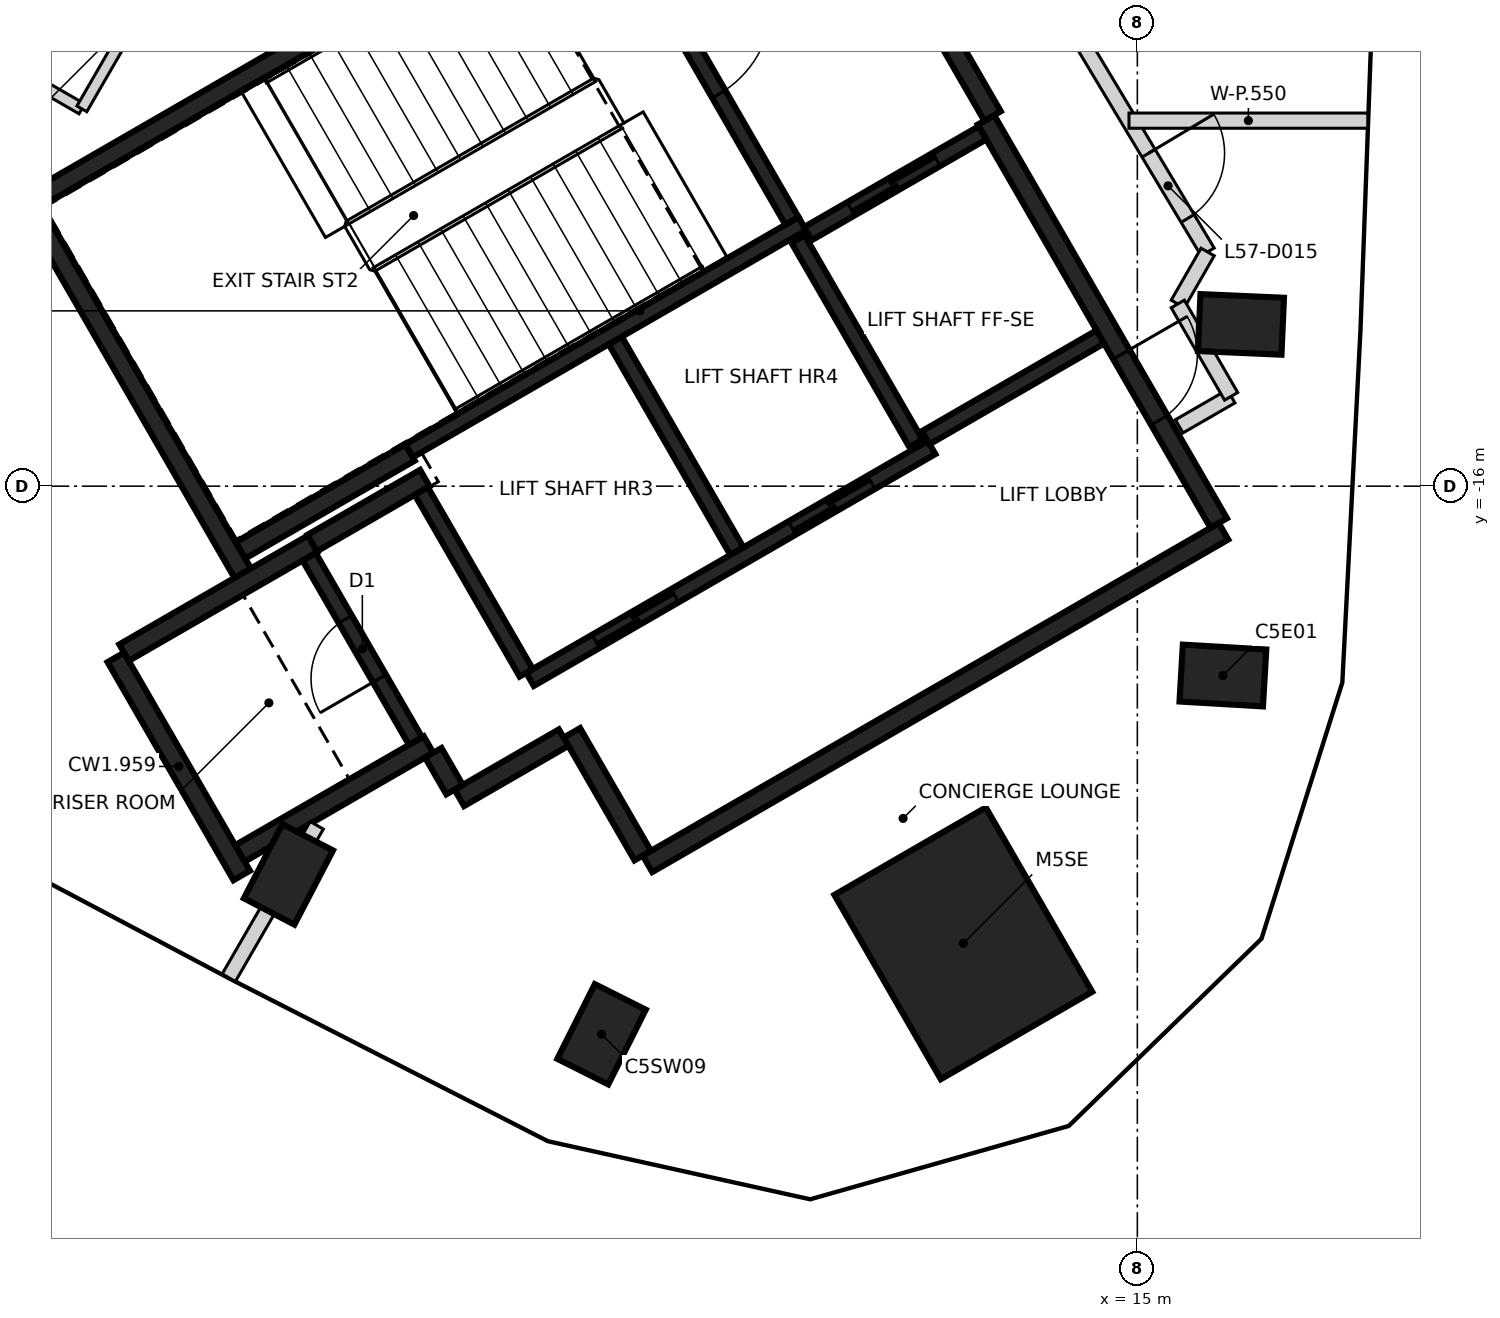
"""IFC4 building model, lengths in metres.
Left out: names, types, materials, properties, quantities, classifications, styles, units other than length and angle.
Written with IfcOpenShell. Run it as: python <this file> out.ifc"""

import sys

from ifc_helpers import new_model, si_unit, direction, frame, frame_2d, origin, origin_2d, place, context, subcontext, project, spatial, rectangle, extrude, element, fill, save


model = new_model("IFC4")
c1 = context("Model", 3, precision=1e-05, world=origin(), true_north=direction((0.0, 1.0)))
c2 = subcontext(c1, "Body", "Model", "MODEL_VIEW")
j1 = project(units=[si_unit("LENGTHUNIT", "METRE"), si_unit("PLANEANGLEUNIT", "RADIAN")], contexts=[c1])
p1 = place(None, origin())
s1 = spatial("IfcSite", under=j1, at=p1, CompositionType="ELEMENT")
p2 = place(p1, origin())
s2 = spatial("IfcBuilding", under=s1, at=p2, CompositionType="ELEMENT")
p3 = place(p2, frame((0.0, 0.0, 228.6)))
s3 = spatial("IfcBuildingStorey", under=s2, at=p3, CompositionType="ELEMENT", Elevation=228.6)
for number, where, z_axis, x_axis in (
    (1, (16.125, -18.491, -0.35), (0.0, 0.0, 1.0), (-0.998, 0.058, 0.0)),
    (2, (16.363, -13.872, -0.35), (0.0, 0.0, 1.0), (-0.999, 0.044, 0.0)),
    (3, (3.832, -21.107, -0.35), (0.0, 0.0, 1.0), (0.461, 0.887, 0.0)),
    (4, (7.951, -23.211, -0.35), (0.0, 0.0, 1.0), (0.449, 0.894, 0.0)),
):
    element("IfcColumn", number, at=place(p3, frame(where, z_axis=z_axis, x_axis=x_axis)), inside=s3, PredefinedType="COLUMN", context=c2, shape_type="SweptSolid", body=[
        extrude(rectangle(XDim=1.1, YDim=0.75, at=origin_2d()), origin(), (0.0, 0.0, 1.0), 3.6),
    ])
p4 = place(p3, frame((12.71, -22.015, -0.35), z_axis=(0.0, 0.0, 1.0), x_axis=(-0.5, 0.866025403784, 0.0)))
e5 = element("IfcColumn", 5, at=p4, inside=s3, PredefinedType="COLUMN", context=c2, shape_type="SweptSolid", body=[
    extrude(rectangle(XDim=2.8, YDim=2.3, at=origin_2d()), origin(), (0.0, 0.0, 1.0), 3.6),
])
p5 = place(p3, frame((0.417, -12.273, 0.0), z_axis=(0.0, 0.0, 1.0), x_axis=(0.866021906294, 0.500006057782, 0.0)))
e6 = element("IfcWall", 6, at=p5, inside=s3, PredefinedType="SHEAR", context=c2, shape_type="SweptSolid", body=[
    extrude(rectangle(XDim=11.55, YDim=0.25, at=frame_2d((5.775, 0.0))), origin(), (0.0, 0.0, 1.0), 3.25),
])
p6 = place(p5, frame((10.025, 0.0, 0.0)))
e7 = element("IfcOpeningElement", 7, at=p6, cuts=e6, PredefinedType="OPENING", context=c2, shape_type="SweptSolid", body=[
    extrude(rectangle(XDim=1.2, YDim=2.1, at=frame_2d((0.6, 1.05))), frame((0.0, 0.135, 0.0), z_axis=(0.0, -1.0, 0.0), x_axis=(1.0, 0.0, 0.0)), (0.0, 0.0, 1.0), 0.27),
])
p7 = place(p5, frame((8.725, 0.0, 0.0)))
e8 = element("IfcOpeningElement", 8, at=p7, cuts=e6, PredefinedType="OPENING", context=c2, shape_type="SweptSolid", body=[
    extrude(rectangle(XDim=1.2, YDim=2.1, at=frame_2d((0.6, 1.05))), frame((0.0, 0.135, 0.0), z_axis=(0.0, -1.0, 0.0), x_axis=(1.0, 0.0, 0.0)), (0.0, 0.0, 1.0), 0.27),
])
p8 = place(p3, frame((16.133, -16.594, 0.0), z_axis=(0.0, 0.0, 1.0), x_axis=(-0.866022959057, -0.500004234368, 0.0)))
e9 = element("IfcWall", 9, at=p8, inside=s3, PredefinedType="SHEAR", context=c2, shape_type="SweptSolid", body=[
    extrude(rectangle(XDim=8.75, YDim=0.25, at=frame_2d((4.375, 0.0))), origin(), (0.0, 0.0, 1.0), 3.25),
])
p9 = place(p3, frame((13.008, -11.181, 0.0), z_axis=(0.0, 0.0, 1.0), x_axis=(0.500001955336, -0.866024274868, 0.0)))
e10 = element("IfcWall", 10, at=p9, inside=s3, PredefinedType="SHEAR", context=c2, shape_type="SweptSolid", body=[
    extrude(rectangle(XDim=6.125, YDim=0.25, at=frame_2d((3.062, 0.0))), origin(), (0.0, 0.0, 1.0), 3.25),
])
p10 = place(p9, frame((3.563, 0.0, 0.0)))
e11 = element("IfcOpeningElement", 11, at=p10, cuts=e10, PredefinedType="OPENING", context=c2, shape_type="SweptSolid", body=[
    extrude(rectangle(XDim=1.0, YDim=2.1, at=frame_2d((0.5, 1.05))), frame((0.0, 0.135, 0.0), z_axis=(0.0, -1.0, 0.0), x_axis=(1.0, 0.0, 0.0)), (0.0, 0.0, 1.0), 0.27),
])
p11 = place(p3, frame((3.235, -17.153, 0.0), z_axis=(0.0, 0.0, 1.0), x_axis=(-0.500008851346, 0.866020293397, 0.0)))
e12 = element("IfcWall", 12, at=p11, inside=s3, PredefinedType="SHEAR", context=c2, shape_type="SweptSolid", body=[
    extrude(rectangle(XDim=5.51, YDim=0.25, at=frame_2d((2.755, 0.0))), origin(), (0.0, 0.0, 1.0), 3.25),
])
p12 = place(p3, frame((10.483, -6.606, 0.0), z_axis=(0.0, 0.0, 1.0), x_axis=(0.49999885962, -0.866026062182, 0.0)))
e13 = element("IfcWall", 13, at=p12, inside=s3, PredefinedType="SHEAR", context=c2, shape_type="SweptSolid", body=[
    extrude(rectangle(XDim=5.225, YDim=0.25, at=frame_2d((2.612, 0.0))), origin(), (0.0, 0.0, 1.0), 3.25),
])
p13 = place(p3, frame((3.217, -21.122, 0.0), z_axis=(0.0, 0.0, 1.0), x_axis=(-0.499998874531, 0.866026053573, 0.0)))
e14 = element("IfcWall", 14, at=p13, inside=s3, PredefinedType="SHEAR", context=c2, shape_type="SweptSolid", body=[
    extrude(rectangle(XDim=3.313, YDim=0.25, at=frame_2d((1.656, 0.0))), origin(), (0.0, 0.0, 1.0), 3.25),
])
p14 = place(p3, frame((1.669, -18.19, 0.0), z_axis=(0.0, 0.0, 1.0), x_axis=(0.866042235819, 0.499970844928, 0.0)))
e15 = element("IfcWall", 15, at=p14, inside=s3, PredefinedType="SHEAR", context=c2, shape_type="SweptSolid", body=[
    extrude(rectangle(XDim=2.865, YDim=0.25, at=frame_2d((1.432, 0.0))), origin(), (0.0, 0.0, 1.0), 3.25),
])
p15 = place(p3, frame((5.675, -19.399, 0.0), z_axis=(0.0, 0.0, 1.0), x_axis=(-0.866026637627, -0.499997862916, 0.0)))
e16 = element("IfcWall", 16, at=p15, inside=s3, PredefinedType="SHEAR", context=c2, shape_type="SweptSolid", body=[
    extrude(rectangle(XDim=2.865, YDim=0.25, at=frame_2d((1.432, 0.0))), origin(), (0.0, 0.0, 1.0), 3.25),
])
p16 = place(p3, frame((5.431, -15.556, 0.0), z_axis=(0.0, 0.0, 1.0), x_axis=(-0.866022940537, -0.500004266446, 0.0)))
e17 = element("IfcWall", 17, at=p16, inside=s3, PredefinedType="SHEAR", context=c2, shape_type="SweptSolid", body=[
    extrude(rectangle(XDim=2.575, YDim=0.25, at=frame_2d((1.287, 0.0))), origin(), (0.0, 0.0, 1.0), 3.25),
])
p17 = place(p3, frame((8.493, -20.86, 0.0), z_axis=(0.0, 0.0, 1.0), x_axis=(-0.500039802285, 0.866002422705, 0.0)))
e18 = element("IfcWall", 18, at=p17, inside=s3, PredefinedType="SHEAR", context=c2, shape_type="SweptSolid", body=[
    extrude(rectangle(XDim=1.865, YDim=0.25, at=frame_2d((0.932, 0.0))), origin(), (0.0, 0.0, 1.0), 3.25),
])
p18 = place(p3, frame((4.145, -16.749, 0.0), z_axis=(0.0, 0.0, 1.0), x_axis=(0.866038183914, 0.499977863513, 0.0)))
e19 = element("IfcWall", 19, at=p18, inside=s3, PredefinedType="SHEAR", context=c2, shape_type="SweptSolid", body=[
    extrude(rectangle(XDim=1.71, YDim=0.25, at=frame_2d((0.855, 0.0))), origin(), (0.0, 0.0, 1.0), 3.25),
])
p19 = place(p3, frame((7.452, -19.308, 0.0), z_axis=(0.0, 0.0, 1.0), x_axis=(-0.866044474677, -0.49996696679, 0.0)))
e20 = element("IfcWall", 20, at=p19, inside=s3, PredefinedType="SHEAR", context=c2, shape_type="SweptSolid", body=[
    extrude(rectangle(XDim=1.584, YDim=0.25, at=frame_2d((0.792, 0.0))), origin(), (0.0, 0.0, 1.0), 3.25),
])
p20 = place(p3, frame((6.017, -19.992, 0.0), z_axis=(0.0, 0.0, 1.0), x_axis=(-0.500364886717, 0.865814633822, 0.0)))
e21 = element("IfcWall", 21, at=p20, inside=s3, PredefinedType="SHEAR", context=c2, shape_type="SweptSolid", body=[
    extrude(rectangle(XDim=0.559, YDim=0.25, at=frame_2d((0.28, 0.0))), origin(), (0.0, 0.0, 1.0), 3.25),
])
p21 = place(p3, frame((5.419, -15.534, 0.0), z_axis=(0.0, 0.0, 1.0), x_axis=(0.866029065029, 0.499993658486, 0.0)))
e22 = element("IfcWall", 22, at=p21, inside=s3, PredefinedType="SHEAR", context=c2, shape_type="SweptSolid", body=[
    extrude(rectangle(XDim=5.974, YDim=0.2, at=frame_2d((2.987, 0.0))), origin(), (0.0, 0.0, 1.0), 3.25),
])
p22 = place(p3, frame((7.01, -18.542, 0.0), z_axis=(0.0, 0.0, 1.0), x_axis=(0.866030299012, 0.499991521122, 0.0)))
e23 = element("IfcWall", 23, at=p22, inside=s3, PredefinedType="SHEAR", context=c2, shape_type="SweptSolid", body=[
    extrude(rectangle(XDim=6.1, YDim=0.2, at=frame_2d((3.05, 0.0))), origin(), (0.0, 0.0, 1.0), 3.25),
])
p23 = place(p22, frame((1.0, 0.0, 0.0)))
e24 = element("IfcOpeningElement", 24, at=p23, cuts=e23, PredefinedType="OPENING", context=c2, shape_type="SweptSolid", body=[
    extrude(rectangle(XDim=1.2, YDim=2.1, at=frame_2d((0.6, 1.05))), frame((0.0, 0.11, 0.0), z_axis=(0.0, -1.0, 0.0), x_axis=(1.0, 0.0, 0.0)), (0.0, 0.0, 1.0), 0.22),
])
p24 = place(p22, frame((3.982, 0.0, 0.0)))
e25 = element("IfcOpeningElement", 25, at=p24, cuts=e23, PredefinedType="OPENING", context=c2, shape_type="SweptSolid", body=[
    extrude(rectangle(XDim=1.2, YDim=2.1, at=frame_2d((0.6, 1.05))), frame((0.0, 0.11, 0.0), z_axis=(0.0, -1.0, 0.0), x_axis=(1.0, 0.0, 0.0)), (0.0, 0.0, 1.0), 0.22),
])
p25 = place(p3, frame((7.906, -8.094, 0.0), z_axis=(0.0, 0.0, 1.0), x_axis=(0.500027839223, -0.866009330205, 0.0)))
e26 = element("IfcWall", 26, at=p25, inside=s3, PredefinedType="SHEAR", context=c2, shape_type="SweptSolid", body=[
    extrude(rectangle(XDim=5.098, YDim=0.2, at=frame_2d((2.549, 0.0))), origin(), (0.0, 0.0, 1.0), 3.25),
])
p26 = place(p25, frame((1.774, 0.0, 0.0)))
e27 = element("IfcOpeningElement", 27, at=p26, cuts=e26, PredefinedType="OPENING", context=c2, shape_type="SweptSolid", body=[
    extrude(rectangle(XDim=1.4, YDim=2.1, at=frame_2d((0.7, 1.05))), frame((0.0, 0.11, 0.0), z_axis=(0.0, -1.0, 0.0), x_axis=(1.0, 0.0, 0.0)), (0.0, 0.0, 1.0), 0.22),
])
p27 = place(p3, frame((8.132, -14.084, 0.0), z_axis=(0.0, 0.0, 1.0), x_axis=(0.499997778408, -0.866026686418, 0.0)))
e28 = element("IfcWall", 28, at=p27, inside=s3, PredefinedType="SHEAR", context=c2, shape_type="SweptSolid", body=[
    extrude(rectangle(XDim=3.198, YDim=0.2, at=frame_2d((1.599, 0.0))), origin(), (0.0, 0.0, 1.0), 3.25),
])
p28 = place(p3, frame((5.503, -19.352, 0.0), z_axis=(0.0, 0.0, 1.0), x_axis=(-0.499986818241, 0.866033014143, 0.0)))
e29 = element("IfcWall", 29, at=p28, inside=s3, PredefinedType="SHEAR", context=c2, shape_type="SweptSolid", body=[
    extrude(rectangle(XDim=2.798, YDim=0.2, at=frame_2d((1.399, 0.0))), origin(), (0.0, 0.0, 1.0), 3.25),
])
p29 = place(p28, frame((0.949, 0.0, 0.0)))
e30 = element("IfcOpeningElement", 30, at=p29, cuts=e29, PredefinedType="OPENING", context=c2, shape_type="SweptSolid", body=[
    extrude(rectangle(XDim=0.9, YDim=2.1, at=frame_2d((0.45, 1.05))), frame((0.0, 0.11, 0.0), z_axis=(0.0, -1.0, 0.0), x_axis=(1.0, 0.0, 0.0)), (0.0, 0.0, 1.0), 0.22),
])
p30 = place(p3, frame((6.96, -18.455, 0.0), z_axis=(0.0, 0.0, 1.0), x_axis=(-0.499926705758, 0.866067716099, 0.0)))
e31 = element("IfcWall", 31, at=p30, inside=s3, PredefinedType="SHEAR", context=c2, shape_type="SweptSolid", body=[
    extrude(rectangle(XDim=2.759, YDim=0.2, at=frame_2d((1.38, 0.0))), origin(), (0.0, 0.0, 1.0), 3.25),
])
p31 = place(p3, frame((12.088, -15.437, 0.0), z_axis=(0.0, 0.0, 1.0), x_axis=(-0.500026960575, 0.86600983753, 0.0)))
e32 = element("IfcWall", 32, at=p31, inside=s3, PredefinedType="SHEAR", context=c2, shape_type="SweptSolid", body=[
    extrude(rectangle(XDim=3.1, YDim=0.2, at=frame_2d((1.55, 0.0))), origin(), (0.0, 0.0, 1.0), 3.25),
])
p32 = place(p3, frame((10.666, -12.678, 0.0), z_axis=(0.0, 0.0, 1.0), x_axis=(0.866018407898, 0.500012117035, 0.0)))
e33 = element("IfcWall", 33, at=p32, inside=s3, PredefinedType="SHEAR", context=c2, shape_type="SweptSolid", body=[
    extrude(rectangle(XDim=2.651, YDim=0.2, at=frame_2d((1.325, 0.0))), origin(), (0.0, 0.0, 1.0), 3.25),
])
p33 = place(p32, frame((0.652, 0.0, 0.0)))
e34 = element("IfcOpeningElement", 34, at=p33, cuts=e33, PredefinedType="OPENING", context=c2, shape_type="SweptSolid", body=[
    extrude(rectangle(XDim=1.3, YDim=2.1, at=frame_2d((0.65, 1.05))), frame((0.0, 0.11, 0.0), z_axis=(0.0, -1.0, 0.0), x_axis=(1.0, 0.0, 0.0)), (0.0, 0.0, 1.0), 0.22),
])
p34 = place(p3, frame((14.512, -14.037, 0.0), z_axis=(0.0, 0.0, 1.0), x_axis=(-0.866018407898, -0.500012117035, 0.0)))
e35 = element("IfcWall", 35, at=p34, inside=s3, PredefinedType="SHEAR", context=c2, shape_type="SweptSolid", body=[
    extrude(rectangle(XDim=2.651, YDim=0.2, at=frame_2d((1.325, 0.0))), origin(), (0.0, 0.0, 1.0), 3.25),
])
p35 = place(p3, frame((11.217, -5.058, 0.0), z_axis=(0.0, 0.0, 1.0), x_axis=(0.513856906336, -0.857875911662, 0.0)))
e36 = element("IfcWall", 36, at=p35, inside=s3, PredefinedType="PARTITIONING", context=c2, shape_type="SweptSolid", body=[
    extrude(rectangle(XDim=9.163, YDim=0.2, at=frame_2d((4.581, 0.0))), origin(), (0.0, 0.0, 1.0), 3.25),
])
p36 = place(p35, frame((7.65, 0.0, 0.0)))
e37 = element("IfcOpeningElement", 37, at=p36, cuts=e36, PredefinedType="OPENING", context=c2, shape_type="SweptSolid", body=[
    extrude(rectangle(XDim=1.0, YDim=2.1, at=frame_2d((0.5, 1.05))), frame((0.0, 0.11, 0.0), z_axis=(0.0, -1.0, 0.0), x_axis=(1.0, 0.0, 0.0)), (0.0, 0.0, 1.0), 0.22),
])
p37 = place(p3, frame((15.55, -15.213, 0.0), z_axis=(0.0, 0.0, 1.0), x_axis=(0.865989998118, 0.500061319399, 0.0)))
e38 = element("IfcWall", 38, at=p37, inside=s3, PredefinedType="PARTITIONING", context=c2, shape_type="SweptSolid", body=[
    extrude(rectangle(XDim=0.79, YDim=0.2, at=frame_2d((0.395, 0.0))), origin(), (0.0, 0.0, 1.0), 2.35),
])
p38 = place(p3, frame((15.532, -13.603, 0.0), z_axis=(0.0, 0.0, 1.0), x_axis=(0.498203662485, 0.867060038686, 0.0)))
e39 = element("IfcWall", 39, at=p38, inside=s3, PredefinedType="PARTITIONING", context=c2, shape_type="SweptSolid", body=[
    extrude(rectangle(XDim=0.789, YDim=0.2, at=frame_2d((0.395, 0.0))), origin(), (0.0, 0.0, 1.0), 3.25),
])
p39 = place(p3, frame((15.532, -13.603, 0.0), z_axis=(0.0, 0.0, 1.0), x_axis=(0.500199332748, -0.865910288378, 0.0)))
e40 = element("IfcWall", 40, at=p39, inside=s3, PredefinedType="PARTITIONING", context=c2, shape_type="SweptSolid", body=[
    extrude(rectangle(XDim=1.403, YDim=0.2, at=frame_2d((0.702, 0.0))), origin(), (0.0, 0.0, 1.0), 2.35),
])
p40 = place(p3, frame((-5.097, -18.078, 0.0), z_axis=(0.0, 0.0, 1.0), x_axis=(0.499960272111, 0.866048339477, 0.0)))
e41 = element("IfcWall", 41, at=p40, inside=s3, PredefinedType="PARTITIONING", context=c2, shape_type="SweptSolid", body=[
    extrude(rectangle(XDim=12.204, YDim=0.2, at=frame_2d((6.102, 0.0))), origin(), (0.0, 0.0, 1.0), 3.25),
])
p41 = place(p3, frame((3.047, -22.467, 0.0), z_axis=(0.0, 0.0, 1.0), x_axis=(0.50001757531, 0.866015256437, 0.0)))
e42 = element("IfcWall", 42, at=p41, inside=s3, PredefinedType="PARTITIONING", context=c2, shape_type="SweptSolid", body=[
    extrude(rectangle(XDim=2.315, YDim=0.2, at=frame_2d((1.158, 0.0))), origin(), (0.0, 0.0, 1.0), 3.25),
])
p42 = place(p3, frame((14.89, -11.191, 0.0), z_axis=(0.0, 0.0, 1.0), x_axis=(1.0, 0.0, 0.0)))
e43 = element("IfcWall", 43, at=p42, inside=s3, PredefinedType="PARTITIONING", context=c2, shape_type="SweptSolid", body=[
    extrude(rectangle(XDim=3.142, YDim=0.2, at=frame_2d((1.571, 0.0))), origin(), (0.0, 0.0, 1.0), 2.35),
])
p43 = place(p3, frame((-2.833, -8.757, 0.0), z_axis=(0.0, 0.0, 1.0), x_axis=(0.866002713795, -0.500039298155, 0.0)))
e44 = element("IfcWall", 44, at=p43, inside=s3, PredefinedType="PARTITIONING", context=c2, shape_type="SweptSolid", body=[
    extrude(rectangle(XDim=4.558, YDim=0.15, at=frame_2d((2.279, 0.0))), origin(), (0.0, 0.0, 1.0), 3.25),
])
p44 = place(p3, frame((1.114, -11.036, 0.0), z_axis=(0.0, 0.0, 1.0), x_axis=(0.50002537861, 0.866010750942, 0.0)))
e45 = element("IfcWall", 45, at=p44, inside=s3, PredefinedType="PARTITIONING", context=c2, shape_type="SweptSolid", body=[
    extrude(rectangle(XDim=3.0, YDim=0.15, at=frame_2d((1.5, 0.0))), origin(), (0.0, 0.0, 1.0), 3.25),
])
p45 = place(p44, frame((1.1, 0.0, 0.0)))
e46 = element("IfcOpeningElement", 46, at=p45, cuts=e45, PredefinedType="OPENING", context=c2, shape_type="SweptSolid", body=[
    extrude(rectangle(XDim=0.8, YDim=2.1, at=frame_2d((0.4, 1.05))), frame((0.0, 0.085, 0.0), z_axis=(0.0, -1.0, 0.0), x_axis=(1.0, 0.0, 0.0)), (0.0, 0.0, 1.0), 0.17),
])
p46 = place(p33, origin())
e47 = element("IfcDoor", 47, at=p46, inside=s3, OperationType="SLIDING_TO_RIGHT", PredefinedType="DOOR", context=c2, shape_type="SweptSolid", body=[
    extrude(rectangle(XDim=1.3, YDim=2.1, at=frame_2d((0.65, 1.05))), frame((0.0, 0.025, 0.0), z_axis=(0.0, -1.0, 0.0), x_axis=(1.0, 0.0, 0.0)), (0.0, 0.0, 1.0), 0.05),
])
fill(e34, e47)
p47 = place(p23, origin())
e48 = element("IfcDoor", 48, at=p47, inside=s3, OperationType="DOUBLE_DOOR_SLIDING", PredefinedType="DOOR", context=c2, shape_type="SweptSolid", body=[
    extrude(rectangle(XDim=1.2, YDim=2.1, at=frame_2d((0.6, 1.05))), frame((0.0, 0.025, 0.0), z_axis=(0.0, -1.0, 0.0), x_axis=(1.0, 0.0, 0.0)), (0.0, 0.0, 1.0), 0.05),
])
fill(e24, e48)
p48 = place(p24, origin())
e49 = element("IfcDoor", 49, at=p48, inside=s3, OperationType="DOUBLE_DOOR_SLIDING", PredefinedType="DOOR", context=c2, shape_type="SweptSolid", body=[
    extrude(rectangle(XDim=1.2, YDim=2.1, at=frame_2d((0.6, 1.05))), frame((0.0, 0.025, 0.0), z_axis=(0.0, -1.0, 0.0), x_axis=(1.0, 0.0, 0.0)), (0.0, 0.0, 1.0), 0.05),
])
fill(e25, e49)
p49 = place(p10, origin())
e50 = element("IfcDoor", 50, at=p49, inside=s3, OperationType="SINGLE_SWING_LEFT", PredefinedType="DOOR", context=c2, shape_type="SweptSolid", body=[
    extrude(rectangle(XDim=1.0, YDim=2.1, at=frame_2d((0.5, 1.05))), frame((0.0, 0.025, 0.0), z_axis=(0.0, -1.0, 0.0), x_axis=(1.0, 0.0, 0.0)), (0.0, 0.0, 1.0), 0.05),
])
fill(e11, e50)
p50 = place(p26, origin())
e51 = element("IfcDoor", 51, at=p50, inside=s3, OperationType="SINGLE_SWING_RIGHT", PredefinedType="DOOR", context=c2, shape_type="SweptSolid", body=[
    extrude(rectangle(XDim=1.4, YDim=2.1, at=frame_2d((0.7, 1.05))), frame((0.0, 0.025, 0.0), z_axis=(0.0, -1.0, 0.0), x_axis=(1.0, 0.0, 0.0)), (0.0, 0.0, 1.0), 0.05),
])
fill(e27, e51)
p51 = place(p29, origin())
e52 = element("IfcDoor", 52, at=p51, inside=s3, OperationType="SINGLE_SWING_LEFT", PredefinedType="DOOR", context=c2, shape_type="SweptSolid", body=[
    extrude(rectangle(XDim=0.9, YDim=2.1, at=frame_2d((0.45, 1.05))), frame((0.0, 0.025, 0.0), z_axis=(0.0, -1.0, 0.0), x_axis=(1.0, 0.0, 0.0)), (0.0, 0.0, 1.0), 0.05),
])
fill(e30, e52)
p52 = place(p36, frame((1.0, 0.0, 0.0), z_axis=(0.0, 0.0, 1.0), x_axis=(-1.0, 0.0, 0.0)))
e53 = element("IfcDoor", 53, at=p52, inside=s3, OperationType="SINGLE_SWING_LEFT", PredefinedType="DOOR", context=c2, shape_type="SweptSolid", body=[
    extrude(rectangle(XDim=1.0, YDim=2.1, at=frame_2d((0.5, 1.05))), frame((0.0, 0.025, 0.0), z_axis=(0.0, -1.0, 0.0), x_axis=(1.0, 0.0, 0.0)), (0.0, 0.0, 1.0), 0.05),
])
fill(e37, e53)
save(model, sys.argv[1])
